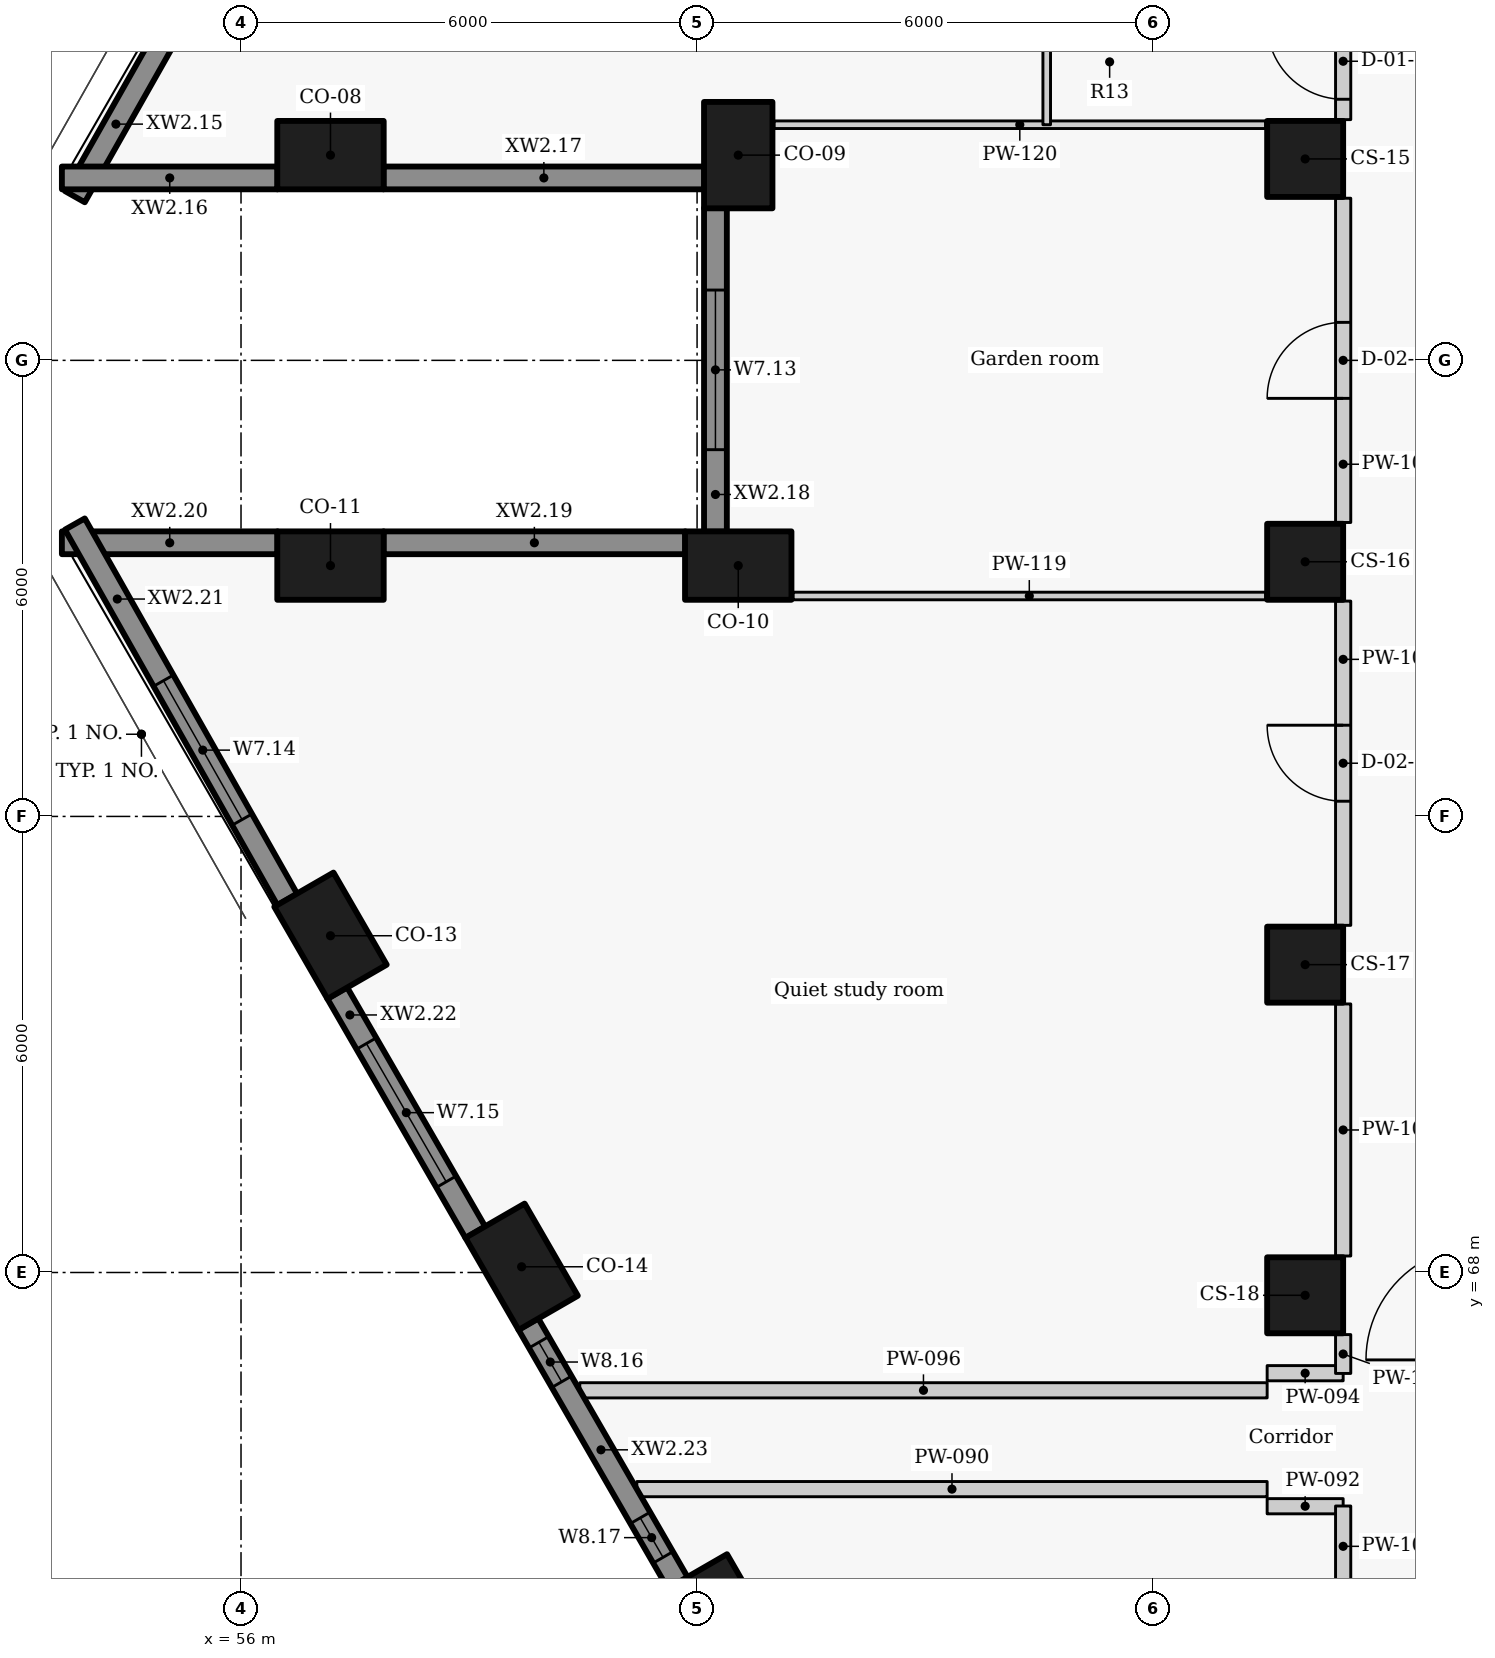
"""IFC4 building model, lengths in metres.
Left out: names, types, materials, properties, quantities, classifications, styles, units other than length and angle.
Written with IfcOpenShell. Run it as: python <this file> out.ifc"""

import sys

from ifc_helpers import new_model, si_unit, direction, frame, frame_2d, origin, origin_2d, place, context, subcontext, project, spatial, rectangle, extrude, element, fill, save


model = new_model("IFC4")
c1 = context("Model", 3, precision=1e-05, world=origin(), true_north=direction((0.0, 1.0)))
c2 = subcontext(c1, "Body", "Model", "MODEL_VIEW")
j1 = project(units=[si_unit("LENGTHUNIT", "METRE"), si_unit("PLANEANGLEUNIT", "RADIAN")], contexts=[c1])
p1 = place(None, origin())
s1 = spatial("IfcSite", under=j1, at=p1, CompositionType="ELEMENT")
p2 = place(p1, origin())
s2 = spatial("IfcBuilding", under=s1, at=p2, CompositionType="ELEMENT")
p3 = place(p2, frame((0.0, 0.0, 114.0)))
s3 = spatial("IfcBuildingStorey", under=s2, at=p3, CompositionType="ELEMENT", Elevation=114.0)
for number, where, z_axis, x_axis in (
    (1, (57.177, 82.7, 0.0), (0.0, 0.0, 1.0), (1.0, 0.0, 0.0)),
    (2, (62.542, 82.7, 0.0), (0.0, 0.0, 1.0), (0.0, -1.0, 0.0)),
    (3, (62.542, 77.3, 0.0), (0.0, 0.0, 1.0), (-1.0, 0.0, 0.0)),
    (4, (57.177, 77.3, 0.0), (0.0, 0.0, 1.0), (-1.0, 0.0, 0.0)),
    (5, (57.177, 72.43, 0.0), (0.0, 0.0, 1.0), (0.5, -0.866, 0.0)),
    (6, (59.692, 68.075, 0.0), (0.0, 0.0, 1.0), (0.5, -0.866, 0.0)),
    (7, (62.354, 63.463, 0.0), (0.0, 0.0, 1.0), (0.5, -0.866, 0.0)),
):
    element("IfcColumn", number, at=place(p3, frame(where, z_axis=z_axis, x_axis=x_axis)), inside=s3, PredefinedType="COLUMN", context=c2, shape_type="SweptSolid", body=[
        extrude(rectangle(XDim=1.4, YDim=0.9, at=origin_2d()), origin(), (0.0, 0.0, 1.0), 3.3),
    ])
for number, where, z_axis, x_axis in (
    (8, (70.0, 82.65, 0.0), (0.0, 0.0, 1.0), (0.0, -1.0, 0.0)),
    (9, (70.0, 77.35, 0.0), (0.0, 0.0, 1.0), (0.0, -1.0, 0.0)),
    (10, (70.0, 72.05, 0.0), (0.0, 0.0, 1.0), (0.0, -1.0, 0.0)),
    (11, (70.0, 67.7, 0.0), (0.0, 0.0, 1.0), (0.0, -1.0, 0.0)),
):
    element("IfcColumn", number, at=place(p3, frame(where, z_axis=z_axis, x_axis=x_axis)), inside=s3, PredefinedType="COLUMN", context=c2, shape_type="SweptSolid", body=[
        extrude(rectangle(XDim=1.0, YDim=1.0, at=origin_2d()), origin(), (0.0, 0.0, 1.0), 3.3),
    ])
p4 = place(p3, frame((56.609, 87.094, 0.0), z_axis=(0.0, 0.0, 1.0), x_axis=(-0.492456858874, -0.870336855561, 0.0)))
e12 = element("IfcWall", 12, at=p4, inside=s3, PredefinedType="SOLIDWALL", context=c2, shape_type="SweptSolid", body=[
    extrude(rectangle(XDim=5.677, YDim=0.3, at=frame_2d((2.838, 0.0))), origin(), (0.0, 0.0, 1.0), 2.425),
])
p5 = place(p4, frame((1.883, 0.0, 0.9)))
e13 = element("IfcOpeningElement", 13, at=p5, cuts=e12, PredefinedType="OPENING", context=c2, shape_type="SweptSolid", body=[
    extrude(rectangle(XDim=1.5, YDim=1.1, at=frame_2d((0.75, 0.55))), frame((0.0, 0.16, 0.0), z_axis=(0.0, -1.0, 0.0), x_axis=(1.0, 0.0, 0.0)), (0.0, 0.0, 1.0), 0.32),
])
p6 = place(p3, frame((53.643, 82.4, 0.0), z_axis=(0.0, 0.0, 1.0), x_axis=(1.0, 0.0, 0.0)))
e14 = element("IfcWall", 14, at=p6, inside=s3, PredefinedType="SOLIDWALL", context=c2, shape_type="SweptSolid", body=[
    extrude(rectangle(XDim=2.838, YDim=0.3, at=frame_2d((1.419, 0.0))), origin(), (0.0, 0.0, 1.0), 2.425),
])
p7 = place(p3, frame((57.873, 82.4, 0.0), z_axis=(0.0, 0.0, 1.0), x_axis=(1.0, 0.0, 0.0)))
e15 = element("IfcWall", 15, at=p7, inside=s3, PredefinedType="SOLIDWALL", context=c2, shape_type="SweptSolid", body=[
    extrude(rectangle(XDim=4.223, YDim=0.3, at=frame_2d((2.111, 0.0))), origin(), (0.0, 0.0, 1.0), 2.425),
])
p8 = place(p3, frame((62.242, 82.004, 0.0), z_axis=(0.0, 0.0, 1.0), x_axis=(0.0, -1.0, 0.0)))
e16 = element("IfcWall", 16, at=p8, inside=s3, PredefinedType="SOLIDWALL", context=c2, shape_type="SweptSolid", body=[
    extrude(rectangle(XDim=4.258, YDim=0.3, at=frame_2d((2.129, 0.0))), origin(), (0.0, 0.0, 1.0), 2.425),
])
p9 = place(p8, frame((1.079, 0.0, 0.9)))
e17 = element("IfcOpeningElement", 17, at=p9, cuts=e16, PredefinedType="OPENING", context=c2, shape_type="SweptSolid", body=[
    extrude(rectangle(XDim=2.1, YDim=1.1, at=frame_2d((1.05, 0.55))), frame((0.0, 0.16, 0.0), z_axis=(0.0, -1.0, 0.0), x_axis=(1.0, 0.0, 0.0)), (0.0, 0.0, 1.0), 0.32),
])
p10 = place(p3, frame((61.846, 77.6, 0.0), z_axis=(0.0, 0.0, 1.0), x_axis=(-1.0, 0.0, 0.0)))
e18 = element("IfcWall", 18, at=p10, inside=s3, PredefinedType="SOLIDWALL", context=c2, shape_type="SweptSolid", body=[
    extrude(rectangle(XDim=3.973, YDim=0.3, at=frame_2d((1.986, 0.0))), origin(), (0.0, 0.0, 1.0), 2.425),
])
p11 = place(p3, frame((56.481, 77.6, 0.0), z_axis=(0.0, 0.0, 1.0), x_axis=(-1.0, 0.0, 0.0)))
e19 = element("IfcWall", 19, at=p11, inside=s3, PredefinedType="SOLIDWALL", context=c2, shape_type="SweptSolid", body=[
    extrude(rectangle(XDim=2.838, YDim=0.3, at=frame_2d((1.419, 0.0))), origin(), (0.0, 0.0, 1.0), 2.425),
])
p12 = place(p3, frame((53.814, 77.847, 0.0), z_axis=(0.0, 0.0, 1.0), x_axis=(0.492456858874, -0.870336855561, 0.0)))
e20 = element("IfcWall", 20, at=p12, inside=s3, PredefinedType="SOLIDWALL", context=c2, shape_type="SweptSolid", body=[
    extrude(rectangle(XDim=5.677, YDim=0.3, at=frame_2d((2.838, 0.0))), origin(), (0.0, 0.0, 1.0), 2.425),
])
p13 = place(p12, frame((2.367, 0.0, 0.9)))
e21 = element("IfcOpeningElement", 21, at=p13, cuts=e20, PredefinedType="OPENING", context=c2, shape_type="SweptSolid", body=[
    extrude(rectangle(XDim=2.1, YDim=1.1, at=frame_2d((1.05, 0.55))), frame((0.0, 0.16, 0.0), z_axis=(0.0, -1.0, 0.0), x_axis=(1.0, 0.0, 0.0)), (0.0, 0.0, 1.0), 0.32),
])
p14 = place(p3, frame((57.265, 71.677, 0.0), z_axis=(0.0, 0.0, 1.0), x_axis=(0.500009139881, -0.866020126807, 0.0)))
e22 = element("IfcWall", 22, at=p14, inside=s3, PredefinedType="SOLIDWALL", context=c2, shape_type="SweptSolid", body=[
    extrude(rectangle(XDim=3.637, YDim=0.3, at=frame_2d((1.818, 0.0))), origin(), (0.0, 0.0, 1.0), 2.425),
])
p15 = place(p14, frame((0.768, 0.0, 0.9)))
e23 = element("IfcOpeningElement", 23, at=p15, cuts=e22, PredefinedType="OPENING", context=c2, shape_type="SweptSolid", body=[
    extrude(rectangle(XDim=2.1, YDim=1.1, at=frame_2d((1.05, 0.55))), frame((0.0, 0.16, 0.0), z_axis=(0.0, -1.0, 0.0), x_axis=(1.0, 0.0, 0.0)), (0.0, 0.0, 1.0), 0.32),
])
p16 = place(p3, frame((59.78, 67.323, 0.0), z_axis=(0.0, 0.0, 1.0), x_axis=(0.499957037901, -0.866050206543, 0.0)))
e24 = element("IfcWall", 24, at=p16, inside=s3, PredefinedType="SOLIDWALL", context=c2, shape_type="SweptSolid", body=[
    extrude(rectangle(XDim=3.934, YDim=0.3, at=frame_2d((1.967, 0.0))), origin(), (0.0, 0.0, 1.0), 2.425),
])
p17 = place(p16, frame((0.278, 0.0, 0.9)))
e25 = element("IfcOpeningElement", 25, at=p17, cuts=e24, PredefinedType="OPENING", context=c2, shape_type="SweptSolid", body=[
    extrude(rectangle(XDim=0.6, YDim=1.1, at=frame_2d((0.3, 0.55))), frame((0.0, 0.16, 0.0), z_axis=(0.0, -1.0, 0.0), x_axis=(1.0, 0.0, 0.0)), (0.0, 0.0, 1.0), 0.32),
])
p18 = place(p16, frame((2.945, 0.0, 0.9)))
e26 = element("IfcOpeningElement", 26, at=p18, cuts=e24, PredefinedType="OPENING", context=c2, shape_type="SweptSolid", body=[
    extrude(rectangle(XDim=0.6, YDim=1.1, at=frame_2d((0.3, 0.55))), frame((0.0, 0.16, 0.0), z_axis=(0.0, -1.0, 0.0), x_axis=(1.0, 0.0, 0.0)), (0.0, 0.0, 1.0), 0.32),
])
p19 = place(p3, frame((61.207, 65.15, 0.0), z_axis=(0.0, 0.0, 1.0), x_axis=(1.0, 0.0, 0.0)))
e27 = element("IfcWall", 27, at=p19, inside=s3, PredefinedType="PARTITIONING", context=c2, shape_type="SweptSolid", body=[
    extrude(rectangle(XDim=8.293, YDim=0.2, at=frame_2d((4.146, 0.0))), origin(), (0.0, 0.0, 1.0), 2.405),
])
for number, where, z_axis, x_axis in (
    (28, (69.5, 64.925, 0.0), (0.0, 0.0, 1.0), (1.0, 0.0, 0.0)),
    (29, (69.5, 66.675, 0.0), (0.0, 0.0, 1.0), (1.0, 0.0, 0.0)),
):
    element("IfcWall", number, at=place(p3, frame(where, z_axis=z_axis, x_axis=x_axis)), inside=s3, PredefinedType="PARTITIONING", context=c2, shape_type="SweptSolid", body=[
        extrude(rectangle(XDim=1.0, YDim=0.2, at=frame_2d((0.5, 0.0))), origin(), (0.0, 0.0, 1.0), 2.505),
    ])
p20 = place(p3, frame((60.457, 66.45, 0.0), z_axis=(0.0, 0.0, 1.0), x_axis=(1.0, 0.0, 0.0)))
e30 = element("IfcWall", 30, at=p20, inside=s3, PredefinedType="PARTITIONING", context=c2, shape_type="SweptSolid", body=[
    extrude(rectangle(XDim=9.043, YDim=0.2, at=frame_2d((4.521, 0.0))), origin(), (0.0, 0.0, 1.0), 2.405),
])
p21 = place(p3, frame((70.5, 63.867, 0.0), z_axis=(0.0, 0.0, 1.0), x_axis=(0.0, 1.0, 0.0)))
e31 = element("IfcWall", 31, at=p21, inside=s3, PredefinedType="PARTITIONING", context=c2, shape_type="SweptSolid", body=[
    extrude(rectangle(XDim=1.061, YDim=0.2, at=frame_2d((0.531, 0.0))), origin(), (0.0, 0.0, 1.0), 3.025),
])
p22 = place(p3, frame((70.5, 66.672, 0.0), z_axis=(0.0, 0.0, 1.0), x_axis=(0.0, 1.0, 0.0)))
e32 = element("IfcWall", 32, at=p22, inside=s3, PredefinedType="PARTITIONING", context=c2, shape_type="SweptSolid", body=[
    extrude(rectangle(XDim=0.511, YDim=0.2, at=frame_2d((0.255, 0.0))), origin(), (0.0, 0.0, 1.0), 3.025),
])
p23 = place(p3, frame((70.5, 68.217, 0.0), z_axis=(0.0, 0.0, 1.0), x_axis=(0.0, 1.0, 0.0)))
e33 = element("IfcWall", 33, at=p23, inside=s3, PredefinedType="PARTITIONING", context=c2, shape_type="SweptSolid", body=[
    extrude(rectangle(XDim=3.316, YDim=0.2, at=frame_2d((1.658, 0.0))), origin(), (0.0, 0.0, 1.0), 3.025),
])
p24 = place(p3, frame((70.5, 72.567, 0.0), z_axis=(0.0, 0.0, 1.0), x_axis=(0.0, 1.0, 0.0)))
e34 = element("IfcWall", 34, at=p24, inside=s3, PredefinedType="PARTITIONING", context=c2, shape_type="SweptSolid", body=[
    extrude(rectangle(XDim=4.266, YDim=0.2, at=frame_2d((2.133, 0.0))), origin(), (0.0, 0.0, 1.0), 3.025),
])
p25 = place(p24, frame((1.633, 0.0, 0.0)))
e35 = element("IfcOpeningElement", 35, at=p25, cuts=e34, PredefinedType="OPENING", context=c2, shape_type="SweptSolid", body=[
    extrude(rectangle(XDim=1.0, YDim=2.1, at=frame_2d((0.5, 1.05))), frame((0.0, 0.11, 0.0), z_axis=(0.0, -1.0, 0.0), x_axis=(1.0, 0.0, 0.0)), (0.0, 0.0, 1.0), 0.22),
])
p26 = place(p3, frame((70.5, 77.867, 0.0), z_axis=(0.0, 0.0, 1.0), x_axis=(0.0, 1.0, 0.0)))
e36 = element("IfcWall", 36, at=p26, inside=s3, PredefinedType="PARTITIONING", context=c2, shape_type="SweptSolid", body=[
    extrude(rectangle(XDim=4.266, YDim=0.2, at=frame_2d((2.133, 0.0))), origin(), (0.0, 0.0, 1.0), 3.025),
])
p27 = place(p26, frame((1.633, 0.0, 0.0)))
e37 = element("IfcOpeningElement", 37, at=p27, cuts=e36, PredefinedType="OPENING", context=c2, shape_type="SweptSolid", body=[
    extrude(rectangle(XDim=1.0, YDim=2.1, at=frame_2d((0.5, 1.05))), frame((0.0, 0.11, 0.0), z_axis=(0.0, -1.0, 0.0), x_axis=(1.0, 0.0, 0.0)), (0.0, 0.0, 1.0), 0.22),
])
p28 = place(p3, frame((70.5, 83.167, 0.0), z_axis=(0.0, 0.0, 1.0), x_axis=(0.0, 1.0, 0.0)))
e38 = element("IfcWall", 38, at=p28, inside=s3, PredefinedType="PARTITIONING", context=c2, shape_type="SweptSolid", body=[
    extrude(rectangle(XDim=4.266, YDim=0.2, at=frame_2d((2.133, 0.0))), origin(), (0.0, 0.0, 1.0), 3.025),
])
p29 = place(p28, frame((0.268, 0.0, 0.0)))
e39 = element("IfcOpeningElement", 39, at=p29, cuts=e38, PredefinedType="OPENING", context=c2, shape_type="SweptSolid", body=[
    extrude(rectangle(XDim=1.0, YDim=2.1, at=frame_2d((0.5, 1.05))), frame((0.0, 0.11, 0.0), z_axis=(0.0, -1.0, 0.0), x_axis=(1.0, 0.0, 0.0)), (0.0, 0.0, 1.0), 0.22),
])
p30 = place(p3, frame((63.262, 76.9, 0.0), z_axis=(0.0, 0.0, 1.0), x_axis=(1.0, 0.0, 0.0)))
e40 = element("IfcWall", 40, at=p30, inside=s3, PredefinedType="PARTITIONING", context=c2, shape_type="SweptSolid", body=[
    extrude(rectangle(XDim=6.218, YDim=0.1, at=frame_2d((3.109, 0.0))), origin(), (0.0, 0.0, 1.0), 3.025),
])
p31 = place(p3, frame((63.012, 83.1, 0.0), z_axis=(0.0, 0.0, 1.0), x_axis=(1.0, 0.0, 0.0)))
e41 = element("IfcWall", 41, at=p31, inside=s3, PredefinedType="PARTITIONING", context=c2, shape_type="SweptSolid", body=[
    extrude(rectangle(XDim=6.468, YDim=0.1, at=frame_2d((3.234, 0.0))), origin(), (0.0, 0.0, 1.0), 3.025),
])
p32 = place(p3, frame((66.6, 83.1, 0.0), z_axis=(0.0, 0.0, 1.0), x_axis=(0.0, 1.0, 0.0)))
e42 = element("IfcWall", 42, at=p32, inside=s3, PredefinedType="PARTITIONING", context=c2, shape_type="SweptSolid", body=[
    extrude(rectangle(XDim=11.15, YDim=0.1, at=frame_2d((5.575, 0.0))), origin(), (0.0, 0.0, 1.0), 3.025),
])
p33 = place(p32, frame((1.169, 0.0, 0.0)))
e43 = element("IfcOpeningElement", 43, at=p33, cuts=e42, PredefinedType="OPENING", context=c2, shape_type="SweptSolid", body=[
    extrude(rectangle(XDim=0.9, YDim=2.1, at=frame_2d((0.45, 1.05))), frame((0.0, 0.06, 0.0), z_axis=(0.0, -1.0, 0.0), x_axis=(1.0, 0.0, 0.0)), (0.0, 0.0, 1.0), 0.12),
])
p34 = place(p32, frame((5.125, 0.0, 0.0)))
e44 = element("IfcOpeningElement", 44, at=p34, cuts=e42, PredefinedType="OPENING", context=c2, shape_type="SweptSolid", body=[
    extrude(rectangle(XDim=0.9, YDim=2.1, at=frame_2d((0.45, 1.05))), frame((0.0, 0.06, 0.0), z_axis=(0.0, -1.0, 0.0), x_axis=(1.0, 0.0, 0.0)), (0.0, 0.0, 1.0), 0.12),
])
p35 = place(p32, frame((9.081, 0.0, 0.0)))
e45 = element("IfcOpeningElement", 45, at=p35, cuts=e42, PredefinedType="OPENING", context=c2, shape_type="SweptSolid", body=[
    extrude(rectangle(XDim=0.9, YDim=2.1, at=frame_2d((0.45, 1.05))), frame((0.0, 0.06, 0.0), z_axis=(0.0, -1.0, 0.0), x_axis=(1.0, 0.0, 0.0)), (0.0, 0.0, 1.0), 0.12),
])
p36 = place(p9, origin())
e46 = element("IfcWindow", 46, at=p36, inside=s3, PartitioningType="SINGLE_PANEL", PredefinedType="WINDOW", context=c2, shape_type="SweptSolid", body=[
    extrude(rectangle(XDim=2.1, YDim=1.1, at=frame_2d((1.05, 0.55))), frame((0.0, 0.03, 0.0), z_axis=(0.0, -1.0, 0.0), x_axis=(1.0, 0.0, 0.0)), (0.0, 0.0, 1.0), 0.06),
])
fill(e17, e46)
p37 = place(p13, origin())
e47 = element("IfcWindow", 47, at=p37, inside=s3, PartitioningType="SINGLE_PANEL", PredefinedType="WINDOW", context=c2, shape_type="SweptSolid", body=[
    extrude(rectangle(XDim=2.1, YDim=1.1, at=frame_2d((1.05, 0.55))), frame((0.0, 0.03, 0.0), z_axis=(0.0, -1.0, 0.0), x_axis=(1.0, 0.0, 0.0)), (0.0, 0.0, 1.0), 0.06),
])
fill(e21, e47)
p38 = place(p15, origin())
e48 = element("IfcWindow", 48, at=p38, inside=s3, PartitioningType="SINGLE_PANEL", PredefinedType="WINDOW", context=c2, shape_type="SweptSolid", body=[
    extrude(rectangle(XDim=2.1, YDim=1.1, at=frame_2d((1.05, 0.55))), frame((0.0, 0.03, 0.0), z_axis=(0.0, -1.0, 0.0), x_axis=(1.0, 0.0, 0.0)), (0.0, 0.0, 1.0), 0.06),
])
fill(e23, e48)
p39 = place(p17, origin())
e49 = element("IfcWindow", 49, at=p39, inside=s3, PartitioningType="SINGLE_PANEL", PredefinedType="WINDOW", context=c2, shape_type="SweptSolid", body=[
    extrude(rectangle(XDim=0.6, YDim=1.1, at=frame_2d((0.3, 0.55))), frame((0.0, 0.03, 0.0), z_axis=(0.0, -1.0, 0.0), x_axis=(1.0, 0.0, 0.0)), (0.0, 0.0, 1.0), 0.06),
])
fill(e25, e49)
p40 = place(p18, origin())
e50 = element("IfcWindow", 50, at=p40, inside=s3, PartitioningType="SINGLE_PANEL", PredefinedType="WINDOW", context=c2, shape_type="SweptSolid", body=[
    extrude(rectangle(XDim=0.6, YDim=1.1, at=frame_2d((0.3, 0.55))), frame((0.0, 0.03, 0.0), z_axis=(0.0, -1.0, 0.0), x_axis=(1.0, 0.0, 0.0)), (0.0, 0.0, 1.0), 0.06),
])
fill(e26, e50)
p41 = place(p25, origin())
e51 = element("IfcDoor", 51, at=p41, inside=s3, OperationType="SINGLE_SWING_RIGHT", PredefinedType="DOOR", context=c2, shape_type="SweptSolid", body=[
    extrude(rectangle(XDim=1.0, YDim=2.1, at=frame_2d((0.5, 1.05))), frame((0.0, 0.025, 0.0), z_axis=(0.0, -1.0, 0.0), x_axis=(1.0, 0.0, 0.0)), (0.0, 0.0, 1.0), 0.05),
])
fill(e35, e51)
p42 = place(p27, origin())
e52 = element("IfcDoor", 52, at=p42, inside=s3, OperationType="SINGLE_SWING_LEFT", PredefinedType="DOOR", context=c2, shape_type="SweptSolid", body=[
    extrude(rectangle(XDim=1.0, YDim=2.1, at=frame_2d((0.5, 1.05))), frame((0.0, 0.025, 0.0), z_axis=(0.0, -1.0, 0.0), x_axis=(1.0, 0.0, 0.0)), (0.0, 0.0, 1.0), 0.05),
])
fill(e37, e52)
p43 = place(p29, origin())
e53 = element("IfcDoor", 53, at=p43, inside=s3, OperationType="SINGLE_SWING_RIGHT", PredefinedType="DOOR", context=c2, shape_type="SweptSolid", body=[
    extrude(rectangle(XDim=1.0, YDim=2.1, at=frame_2d((0.5, 1.05))), frame((0.0, 0.025, 0.0), z_axis=(0.0, -1.0, 0.0), x_axis=(1.0, 0.0, 0.0)), (0.0, 0.0, 1.0), 0.05),
])
fill(e39, e53)
save(model, sys.argv[1])
